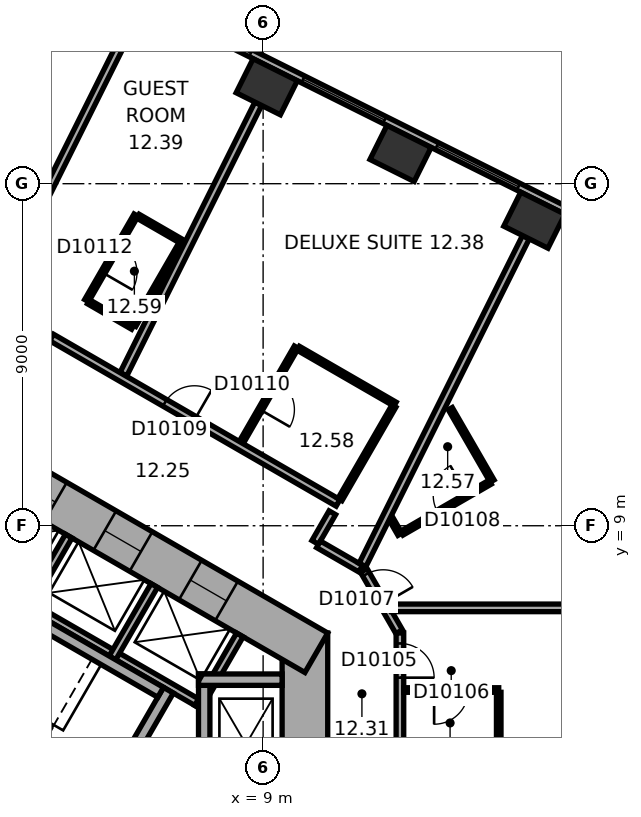
"""IFC4 building model, lengths in metres.
Left out: names, types, materials, properties, quantities, classifications, styles, units other than length and angle.
Written with IfcOpenShell. Run it as: python <this file> out.ifc"""

import sys

from ifc_helpers import new_model, si_unit, direction, frame, frame_2d, origin, origin_2d, place, context, subcontext, project, spatial, rectangle, extrude, element, fill, save


model = new_model("IFC4")
c1 = context("Model", 3, precision=1e-05, world=origin(), true_north=direction((0.0, 1.0)))
c2 = subcontext(c1, "Body", "Model", "MODEL_VIEW")
j1 = project(units=[si_unit("LENGTHUNIT", "METRE"), si_unit("PLANEANGLEUNIT", "RADIAN")], contexts=[c1])
p1 = place(None, origin())
s1 = spatial("IfcSite", under=j1, at=p1, CompositionType="ELEMENT")
p2 = place(p1, origin())
s2 = spatial("IfcBuilding", under=s1, at=p2, CompositionType="ELEMENT")
p3 = place(p2, frame((0.0, 0.0, 60.5)))
s3 = spatial("IfcBuildingStorey", under=s2, at=p3, CompositionType="ELEMENT", Elevation=60.5)
for number, where, z_axis, x_axis in (
    (1, (16.138, 17.04, 0.0), (0.0, 0.0, 1.0), (-0.895, 0.446, 0.0)),
    (2, (12.616, 18.795, 0.0), (0.0, 0.0, 1.0), (-0.895, 0.446, 0.0)),
    (3, (9.095, 20.551, 0.0), (0.0, 0.0, 1.0), (-0.895, 0.446, 0.0)),
):
    element("IfcColumn", number, at=place(p3, frame(where, z_axis=z_axis, x_axis=x_axis)), inside=s3, PredefinedType="COLUMN", context=c2, shape_type="SweptSolid", body=[
        extrude(rectangle(XDim=1.3, YDim=1.0, at=origin_2d()), origin(), (0.0, 0.0, 1.0), 3.3),
    ])
p4 = place(p3, frame((10.1, -6.177, 0.0), z_axis=(0.0, 0.0, 1.0), x_axis=(0.0, 1.0, 0.0)))
e4 = element("IfcWall", 4, at=p4, inside=s3, PredefinedType="SHEAR", context=c2, shape_type="SweptSolid", body=[
    extrude(rectangle(XDim=12.355, YDim=1.2, at=frame_2d((6.177, 0.0))), origin(), (0.0, 0.0, 1.0), 3.3),
])
p5 = place(p4, frame((6.378, 0.0, 0.0)))
e5 = element("IfcOpeningElement", 5, at=p5, cuts=e4, PredefinedType="OPENING", context=c2, shape_type="SweptSolid", body=[
    extrude(rectangle(XDim=1.5, YDim=2.1, at=frame_2d((0.75, 1.05))), frame((0.0, 0.61, 0.0), z_axis=(0.0, -1.0, 0.0), x_axis=(1.0, 0.0, 0.0)), (0.0, 0.0, 1.0), 1.22),
])
p6 = place(p4, frame((1.828, 0.0, 0.0)))
e6 = element("IfcOpeningElement", 6, at=p6, cuts=e4, PredefinedType="OPENING", context=c2, shape_type="SweptSolid", body=[
    extrude(rectangle(XDim=1.1, YDim=2.1, at=frame_2d((0.55, 1.05))), frame((0.0, 0.61, 0.0), z_axis=(0.0, -1.0, 0.0), x_axis=(1.0, 0.0, 0.0)), (0.0, 0.0, 1.0), 1.22),
])
p7 = place(p4, frame((4.427, 0.0, 0.0)))
e7 = element("IfcOpeningElement", 7, at=p7, cuts=e4, PredefinedType="OPENING", context=c2, shape_type="SweptSolid", body=[
    extrude(rectangle(XDim=1.1, YDim=2.1, at=frame_2d((0.55, 1.05))), frame((0.0, 0.61, 0.0), z_axis=(0.0, -1.0, 0.0), x_axis=(1.0, 0.0, 0.0)), (0.0, 0.0, 1.0), 1.22),
])
p8 = place(p3, frame((10.4, 5.658, 0.0), z_axis=(0.0, 0.0, 1.0), x_axis=(-0.866021384402, 0.500006961711, 0.0)))
e8 = element("IfcWall", 8, at=p8, inside=s3, PredefinedType="SHEAR", context=c2, shape_type="SweptSolid", body=[
    extrude(rectangle(XDim=12.355, YDim=1.2, at=frame_2d((6.178, 0.0))), origin(), (0.0, 0.0, 1.0), 3.3),
])
p9 = place(p8, frame((2.728, 0.0, 0.0)))
e9 = element("IfcOpeningElement", 9, at=p9, cuts=e8, PredefinedType="OPENING", context=c2, shape_type="SweptSolid", body=[
    extrude(rectangle(XDim=1.1, YDim=2.1, at=frame_2d((0.55, 1.05))), frame((0.0, 0.61, 0.0), z_axis=(0.0, -1.0, 0.0), x_axis=(1.0, 0.0, 0.0)), (0.0, 0.0, 1.0), 1.22),
])
p10 = place(p8, frame((5.328, 0.0, 0.0)))
e10 = element("IfcOpeningElement", 10, at=p10, cuts=e8, PredefinedType="OPENING", context=c2, shape_type="SweptSolid", body=[
    extrude(rectangle(XDim=1.1, YDim=2.1, at=frame_2d((0.55, 1.05))), frame((0.0, 0.61, 0.0), z_axis=(0.0, -1.0, 0.0), x_axis=(1.0, 0.0, 0.0)), (0.0, 0.0, 1.0), 1.22),
])
p11 = place(p8, frame((7.928, 0.0, 0.0)))
e11 = element("IfcOpeningElement", 11, at=p11, cuts=e8, PredefinedType="OPENING", context=c2, shape_type="SweptSolid", body=[
    extrude(rectangle(XDim=1.1, YDim=2.1, at=frame_2d((0.55, 1.05))), frame((0.0, 0.61, 0.0), z_axis=(0.0, -1.0, 0.0), x_axis=(1.0, 0.0, 0.0)), (0.0, 0.0, 1.0), 1.22),
])
p12 = place(p3, frame((20.63, 15.47, 0.0), z_axis=(0.0, 0.0, 1.0), x_axis=(-0.894934518609, 0.446197498203, 0.0)))
e12 = element("IfcWall", 12, at=p12, inside=s3, PredefinedType="STANDARD", context=c2, shape_type="SweptSolid", body=[
    extrude(rectangle(XDim=21.246, YDim=0.2, at=frame_2d((10.623, 0.0))), origin(), (0.0, 0.0, 1.0), 3.3),
])
p13 = place(p12, frame((1.553, 0.0, 0.8)))
e13 = element("IfcOpeningElement", 13, at=p13, cuts=e12, PredefinedType="OPENING", context=c2, shape_type="SweptSolid", body=[
    extrude(rectangle(XDim=2.4, YDim=1.7, at=frame_2d((1.2, 0.85))), frame((0.0, 0.11, 0.0), z_axis=(0.0, -1.0, 0.0), x_axis=(1.0, 0.0, 0.0)), (0.0, 0.0, 1.0), 0.22),
])
p14 = place(p12, frame((5.488, 0.0, 0.8)))
e14 = element("IfcOpeningElement", 14, at=p14, cuts=e12, PredefinedType="OPENING", context=c2, shape_type="SweptSolid", body=[
    extrude(rectangle(XDim=2.4, YDim=1.7, at=frame_2d((1.2, 0.85))), frame((0.0, 0.11, 0.0), z_axis=(0.0, -1.0, 0.0), x_axis=(1.0, 0.0, 0.0)), (0.0, 0.0, 1.0), 0.22),
])
p15 = place(p12, frame((9.422, 0.0, 0.8)))
e15 = element("IfcOpeningElement", 15, at=p15, cuts=e12, PredefinedType="OPENING", context=c2, shape_type="SweptSolid", body=[
    extrude(rectangle(XDim=2.4, YDim=1.7, at=frame_2d((1.2, 0.85))), frame((0.0, 0.11, 0.0), z_axis=(0.0, -1.0, 0.0), x_axis=(1.0, 0.0, 0.0)), (0.0, 0.0, 1.0), 0.22),
])
p16 = place(p12, frame((13.357, 0.0, 0.8)))
e16 = element("IfcOpeningElement", 16, at=p16, cuts=e12, PredefinedType="OPENING", context=c2, shape_type="SweptSolid", body=[
    extrude(rectangle(XDim=2.4, YDim=1.7, at=frame_2d((1.2, 0.85))), frame((0.0, 0.11, 0.0), z_axis=(0.0, -1.0, 0.0), x_axis=(1.0, 0.0, 0.0)), (0.0, 0.0, 1.0), 0.22),
])
p17 = place(p12, frame((17.292, 0.0, 0.8)))
e17 = element("IfcOpeningElement", 17, at=p17, cuts=e12, PredefinedType="OPENING", context=c2, shape_type="SweptSolid", body=[
    extrude(rectangle(XDim=2.4, YDim=1.7, at=frame_2d((1.2, 0.85))), frame((0.0, 0.11, 0.0), z_axis=(0.0, -1.0, 0.0), x_axis=(1.0, 0.0, 0.0)), (0.0, 0.0, 1.0), 0.22),
])
p18 = place(p3, frame((7.424, 4.259, 0.0), z_axis=(0.0, 0.0, 1.0), x_axis=(-0.866026010844, 0.49999894854, 0.0)))
e18 = element("IfcWall", 18, at=p18, inside=s3, PredefinedType="PARTITIONING", context=c2, shape_type="SweptSolid", body=[
    extrude(rectangle(XDim=8.0, YDim=0.2, at=frame_2d((4.0, 0.0))), origin(), (0.0, 0.0, 1.0), 3.05),
])
for number, where, z_axis, x_axis in (
    (19, (7.287, 4.222, 0.0), (0.0, 0.0, 1.0), (0.5, 0.866, 0.0)),
    (20, (5.036, 5.522, 0.0), (0.0, 0.0, 1.0), (0.5, 0.866, 0.0)),
    (21, (2.784, 6.822, 0.0), (0.0, 0.0, 1.0), (0.5, 0.866, 0.0)),
):
    element("IfcWall", number, at=place(p3, frame(where, z_axis=z_axis, x_axis=x_axis)), inside=s3, PredefinedType="PARTITIONING", context=c2, shape_type="SweptSolid", body=[
        extrude(rectangle(XDim=2.2, YDim=0.2, at=frame_2d((1.1, 0.0))), origin(), (0.0, 0.0, 1.0), 3.05),
    ])
p19 = place(p3, frame((4.158, 0.602, 0.0), z_axis=(0.0, 0.0, 1.0), x_axis=(0.499977259774, 0.866038532462, 0.0)))
e22 = element("IfcWall", 22, at=p19, inside=s3, PredefinedType="SHEAR", context=c2, shape_type="SweptSolid", body=[
    extrude(rectangle(XDim=4.7, YDim=0.3, at=frame_2d((2.35, 0.0))), origin(), (0.0, 0.0, 1.0), 3.05),
])
p20 = place(p19, frame((0.8, 0.0, 0.0)))
e23 = element("IfcOpeningElement", 23, at=p20, cuts=e22, PredefinedType="OPENING", context=c2, shape_type="SweptSolid", body=[
    extrude(rectangle(XDim=1.2, YDim=2.1, at=frame_2d((0.6, 1.05))), frame((0.0, 0.16, 0.0), z_axis=(0.0, -1.0, 0.0), x_axis=(1.0, 0.0, 0.0)), (0.0, 0.0, 1.0), 0.32),
])
for number, where, z_axis, x_axis in (
    (24, (4.103, 0.807, 0.0), (0.0, 0.0, 1.0), (-0.866, 0.5, 0.0)),
    (25, (6.303, 4.617, 0.0), (0.0, 0.0, 1.0), (-0.866, 0.5, 0.0)),
):
    element("IfcWall", number, at=place(p3, frame(where, z_axis=z_axis, x_axis=x_axis)), inside=s3, PredefinedType="SHEAR", context=c2, shape_type="SweptSolid", body=[
        extrude(rectangle(XDim=7.06, YDim=0.3, at=frame_2d((3.53, 0.0))), origin(), (0.0, 0.0, 1.0), 3.05),
    ])
p21 = place(p3, frame((7.45, 1.75, 0.0), z_axis=(0.0, 0.0, 1.0), x_axis=(0.0, 1.0, 0.0)))
e26 = element("IfcWall", 26, at=p21, inside=s3, PredefinedType="SHEAR", context=c2, shape_type="SweptSolid", body=[
    extrude(rectangle(XDim=3.35, YDim=0.3, at=frame_2d((1.675, 0.0))), origin(), (0.0, 0.0, 1.0), 3.05),
])
p22 = place(p3, frame((7.3, 4.95, 0.0), z_axis=(0.0, 0.0, 1.0), x_axis=(1.0, 0.0, 0.0)))
e27 = element("IfcWall", 27, at=p22, inside=s3, PredefinedType="SHEAR", context=c2, shape_type="SweptSolid", body=[
    extrude(rectangle(XDim=2.2, YDim=0.3, at=frame_2d((1.1, 0.0))), origin(), (0.0, 0.0, 1.0), 3.05),
])
p23 = place(p3, frame((4.356, 14.922, 0.0), z_axis=(0.0, 0.0, 1.0), x_axis=(0.499936506574, 0.866062058628, 0.0)))
e28 = element("IfcWall", 28, at=p23, inside=s3, PredefinedType="PARTITIONING", context=c2, shape_type="SweptSolid", body=[
    extrude(rectangle(XDim=2.6, YDim=0.12, at=frame_2d((1.3, 0.0))), origin(), (0.0, 0.0, 1.0), 3.05),
])
p24 = place(p23, frame((0.85, 0.0, 0.0)))
e29 = element("IfcOpeningElement", 29, at=p24, cuts=e28, PredefinedType="OPENING", context=c2, shape_type="SweptSolid", body=[
    extrude(rectangle(XDim=0.9, YDim=2.1, at=frame_2d((0.45, 1.05))), frame((0.0, 0.07, 0.0), z_axis=(0.0, -1.0, 0.0), x_axis=(1.0, 0.0, 0.0)), (0.0, 0.0, 1.0), 0.14),
])
p25 = place(p3, frame((5.351, 21.859, 0.0), z_axis=(0.0, 0.0, 1.0), x_axis=(-0.446205309328, -0.894930624086, 0.0)))
e30 = element("IfcWall", 30, at=p25, inside=s3, PredefinedType="PARTITIONING", context=c2, shape_type="SweptSolid", body=[
    extrude(rectangle(XDim=8.913, YDim=0.2, at=frame_2d((4.457, 0.0))), origin(), (0.0, 0.0, 1.0), 2.6),
])
p26 = place(p3, frame((5.569, 14.222, 0.0), z_axis=(0.0, 0.0, 1.0), x_axis=(-0.866036909293, 0.499980071345, 0.0)))
e31 = element("IfcWall", 31, at=p26, inside=s3, PredefinedType="PARTITIONING", context=c2, shape_type="SweptSolid", body=[
    extrude(rectangle(XDim=1.34, YDim=0.12, at=frame_2d((0.67, 0.0))), origin(), (0.0, 0.0, 1.0), 3.05),
])
p27 = place(p3, frame((5.708, 17.144, 0.0), z_axis=(0.0, 0.0, 1.0), x_axis=(0.866082447003, -0.499901185229, 0.0)))
e32 = element("IfcWall", 32, at=p27, inside=s3, PredefinedType="PARTITIONING", context=c2, shape_type="SweptSolid", body=[
    extrude(rectangle(XDim=1.34, YDim=0.12, at=frame_2d((0.67, 0.0))), origin(), (0.0, 0.0, 1.0), 3.05),
])
p28 = place(p3, frame((6.839, 16.422, 0.0), z_axis=(0.0, 0.0, 1.0), x_axis=(-0.50000366821, -0.866023285932, 0.0)))
e33 = element("IfcWall", 33, at=p28, inside=s3, PredefinedType="PARTITIONING", context=c2, shape_type="SweptSolid", body=[
    extrude(rectangle(XDim=2.48, YDim=0.12, at=frame_2d((1.24, 0.0))), origin(), (0.0, 0.0, 1.0), 3.05),
])
p29 = place(p3, frame((8.424, 11.188, 0.0), z_axis=(0.0, 0.0, 1.0), x_axis=(0.49995078051, 0.866053818805, 0.0)))
e34 = element("IfcWall", 34, at=p29, inside=s3, PredefinedType="PARTITIONING", context=c2, shape_type="SweptSolid", body=[
    extrude(rectangle(XDim=2.9, YDim=0.12, at=frame_2d((1.45, 0.0))), origin(), (0.0, 0.0, 1.0), 3.05),
])
p30 = place(p29, frame((1.0, 0.0, 0.0)))
e35 = element("IfcOpeningElement", 35, at=p30, cuts=e34, PredefinedType="OPENING", context=c2, shape_type="SweptSolid", body=[
    extrude(rectangle(XDim=0.9, YDim=2.1, at=frame_2d((0.45, 1.05))), frame((0.0, 0.07, 0.0), z_axis=(0.0, -1.0, 0.0), x_axis=(1.0, 0.0, 0.0)), (0.0, 0.0, 1.0), 0.14),
])
p31 = place(p3, frame((8.872, 20.104, 0.0), z_axis=(0.0, 0.0, 1.0), x_axis=(-0.446218378653, -0.894924107706, 0.0)))
e36 = element("IfcWall", 36, at=p31, inside=s3, PredefinedType="PARTITIONING", context=c2, shape_type="SweptSolid", body=[
    extrude(rectangle(XDim=7.95, YDim=0.2, at=frame_2d((3.975, 0.0))), origin(), (0.0, 0.0, 1.0), 3.05),
])
p32 = place(p3, frame((9.926, 13.67, 0.0), z_axis=(0.0, 0.0, 1.0), x_axis=(0.866032090307, -0.499988418424, 0.0)))
e37 = element("IfcWall", 37, at=p32, inside=s3, PredefinedType="PARTITIONING", context=c2, shape_type="SweptSolid", body=[
    extrude(rectangle(XDim=2.94, YDim=0.12, at=frame_2d((1.47, 0.0))), origin(), (0.0, 0.0, 1.0), 3.05),
])
p33 = place(p3, frame((10.371, 8.561, 0.0), z_axis=(0.0, 0.0, 1.0), x_axis=(0.50004290449, 0.866000631449, 0.0)))
e38 = element("IfcWall", 38, at=p33, inside=s3, PredefinedType="PARTITIONING", context=c2, shape_type="SweptSolid", body=[
    extrude(rectangle(XDim=0.901, YDim=0.2, at=frame_2d((0.451, 0.0))), origin(), (0.0, 0.0, 1.0), 3.05),
])
p34 = place(p3, frame((10.972, 9.602, 0.0), z_axis=(0.0, 0.0, 1.0), x_axis=(-0.866033277307, 0.499986362411, 0.0)))
e39 = element("IfcWall", 39, at=p34, inside=s3, PredefinedType="PARTITIONING", context=c2, shape_type="SweptSolid", body=[
    extrude(rectangle(XDim=8.702, YDim=0.2, at=frame_2d((4.351, 0.0))), origin(), (0.0, 0.0, 1.0), 3.05),
])
p35 = place(p34, frame((4.364, 0.0, 0.0)))
e40 = element("IfcOpeningElement", 40, at=p35, cuts=e39, PredefinedType="OPENING", context=c2, shape_type="SweptSolid", body=[
    extrude(rectangle(XDim=0.9, YDim=2.1, at=frame_2d((0.45, 1.05))), frame((0.0, 0.11, 0.0), z_axis=(0.0, -1.0, 0.0), x_axis=(1.0, 0.0, 0.0)), (0.0, 0.0, 1.0), 0.22),
])
p36 = place(p3, frame((11.566, 7.871, 0.0), z_axis=(0.0, 0.0, 1.0), x_axis=(-0.866004557827, 0.500036104519, 0.0)))
e41 = element("IfcWall", 41, at=p36, inside=s3, PredefinedType="PARTITIONING", context=c2, shape_type="SweptSolid", body=[
    extrude(rectangle(XDim=1.28, YDim=0.2, at=frame_2d((0.64, 0.0))), origin(), (0.0, 0.0, 1.0), 3.05),
])
p37 = place(p3, frame((12.442, 12.148, 0.0), z_axis=(0.0, 0.0, 1.0), x_axis=(-0.49994816717, -0.866055327414, 0.0)))
e42 = element("IfcWall", 42, at=p37, inside=s3, PredefinedType="PARTITIONING", context=c2, shape_type="SweptSolid", body=[
    extrude(rectangle(XDim=2.84, YDim=0.12, at=frame_2d((1.42, 0.0))), origin(), (0.0, 0.0, 1.0), 3.05),
])
p38 = place(p3, frame((12.58, 6.212, 0.0), z_axis=(0.0, 0.0, 1.0), x_axis=(-0.500063286585, 0.865988862174, 0.0)))
e43 = element("IfcWall", 43, at=p38, inside=s3, PredefinedType="PARTITIONING", context=c2, shape_type="SweptSolid", body=[
    extrude(rectangle(XDim=1.86, YDim=0.2, at=frame_2d((0.93, 0.0))), origin(), (0.0, 0.0, 1.0), 3.05),
])
p39 = place(p38, frame((0.842, 0.0, 0.0)))
e44 = element("IfcOpeningElement", 44, at=p39, cuts=e43, PredefinedType="OPENING", context=c2, shape_type="SweptSolid", body=[
    extrude(rectangle(XDim=0.9, YDim=2.1, at=frame_2d((0.45, 1.05))), frame((0.0, 0.11, 0.0), z_axis=(0.0, -1.0, 0.0), x_axis=(1.0, 0.0, 0.0)), (0.0, 0.0, 1.0), 0.22),
])
p40 = place(p3, frame((12.6, 3.004, 0.0), z_axis=(0.0, 0.0, 1.0), x_axis=(0.0, 1.0, 0.0)))
e45 = element("IfcWall", 45, at=p40, inside=s3, PredefinedType="PARTITIONING", context=c2, shape_type="SweptSolid", body=[
    extrude(rectangle(XDim=3.173, YDim=0.2, at=frame_2d((1.586, 0.0))), origin(), (0.0, 0.0, 1.0), 3.05),
])
p41 = place(p40, frame((1.998, 0.0, 0.0)))
e46 = element("IfcOpeningElement", 46, at=p41, cuts=e45, PredefinedType="OPENING", context=c2, shape_type="SweptSolid", body=[
    extrude(rectangle(XDim=0.9, YDim=2.1, at=frame_2d((0.45, 1.05))), frame((0.0, 0.11, 0.0), z_axis=(0.0, -1.0, 0.0), x_axis=(1.0, 0.0, 0.0)), (0.0, 0.0, 1.0), 0.22),
])
p42 = place(p3, frame((12.601, 8.776, 0.0), z_axis=(0.0, 0.0, 1.0), x_axis=(-0.500166486798, 0.865929261247, 0.0)))
e47 = element("IfcWall", 47, at=p42, inside=s3, PredefinedType="PARTITIONING", context=c2, shape_type="SweptSolid", body=[
    extrude(rectangle(XDim=0.476, YDim=0.12, at=frame_2d((0.238, 0.0))), origin(), (0.0, 0.0, 1.0), 3.05),
])
p43 = place(p3, frame((12.7, 4.677, 0.0), z_axis=(0.0, 0.0, 1.0), x_axis=(1.0, 0.0, 0.0)))
e48 = element("IfcWall", 48, at=p43, inside=s3, PredefinedType="PARTITIONING", context=c2, shape_type="SweptSolid", body=[
    extrude(rectangle(XDim=2.5, YDim=0.12, at=frame_2d((1.25, 0.0))), origin(), (0.0, 0.0, 1.0), 3.05),
])
p44 = place(p43, frame((0.8, 0.0, 0.0)))
e49 = element("IfcOpeningElement", 49, at=p44, cuts=e48, PredefinedType="OPENING", context=c2, shape_type="SweptSolid", body=[
    extrude(rectangle(XDim=0.9, YDim=2.1, at=frame_2d((0.45, 1.05))), frame((0.0, 0.07, 0.0), z_axis=(0.0, -1.0, 0.0), x_axis=(1.0, 0.0, 0.0)), (0.0, 0.0, 1.0), 0.14),
])
p45 = place(p3, frame((13.926, 12.081, 0.0), z_axis=(0.0, 0.0, 1.0), x_axis=(0.499994660107, -0.866028486751, 0.0)))
e50 = element("IfcWall", 50, at=p45, inside=s3, PredefinedType="PARTITIONING", context=c2, shape_type="SweptSolid", body=[
    extrude(rectangle(XDim=2.2, YDim=0.12, at=frame_2d((1.1, 0.0))), origin(), (0.0, 0.0, 1.0), 3.05),
])
p46 = place(p3, frame((14.974, 10.146, 0.0), z_axis=(0.0, 0.0, 1.0), x_axis=(-0.86599746015, -0.500048396672, 0.0)))
e51 = element("IfcWall", 51, at=p46, inside=s3, PredefinedType="PARTITIONING", context=c2, shape_type="SweptSolid", body=[
    extrude(rectangle(XDim=2.68, YDim=0.12, at=frame_2d((1.34, 0.0))), origin(), (0.0, 0.0, 1.0), 3.05),
])
p47 = place(p46, frame((0.69, 0.0, 0.0)))
e52 = element("IfcOpeningElement", 52, at=p47, cuts=e51, PredefinedType="OPENING", context=c2, shape_type="SweptSolid", body=[
    extrude(rectangle(XDim=0.9, YDim=2.1, at=frame_2d((0.45, 1.05))), frame((0.0, 0.07, 0.0), z_axis=(0.0, -1.0, 0.0), x_axis=(1.0, 0.0, 0.0)), (0.0, 0.0, 1.0), 0.14),
])
p48 = place(p3, frame((15.2, 4.618, 0.0), z_axis=(0.0, 0.0, 1.0), x_axis=(0.0, -1.0, 0.0)))
e53 = element("IfcWall", 53, at=p48, inside=s3, PredefinedType="PARTITIONING", context=c2, shape_type="SweptSolid", body=[
    extrude(rectangle(XDim=1.613, YDim=0.12, at=frame_2d((0.807, 0.0))), origin(), (0.0, 0.0, 1.0), 3.05),
])
p49 = place(p3, frame((15.915, 16.592, 0.0), z_axis=(0.0, 0.0, 1.0), x_axis=(-0.446199736347, -0.894933402709, 0.0)))
e54 = element("IfcWall", 54, at=p49, inside=s3, PredefinedType="PARTITIONING", context=c2, shape_type="SweptSolid", body=[
    extrude(rectangle(XDim=9.635, YDim=0.2, at=frame_2d((4.817, 0.0))), origin(), (0.0, 0.0, 1.0), 3.05),
])
p50 = place(p3, frame((21.95, 6.839, 0.0), z_axis=(0.0, 0.0, 1.0), x_axis=(-1.0, 0.0, 0.0)))
e55 = element("IfcWall", 55, at=p50, inside=s3, PredefinedType="PARTITIONING", context=c2, shape_type="SweptSolid", body=[
    extrude(rectangle(XDim=9.572, YDim=0.2, at=frame_2d((4.786, 0.0))), origin(), (0.0, 0.0, 1.0), 3.05),
])
p51 = place(p14, origin())
e56 = element("IfcWindow", 56, at=p51, inside=s3, PartitioningType="SINGLE_PANEL", PredefinedType="WINDOW", context=c2, shape_type="SweptSolid", body=[
    extrude(rectangle(XDim=2.4, YDim=1.7, at=frame_2d((1.2, 0.85))), frame((0.0, 0.03, 0.0), z_axis=(0.0, -1.0, 0.0), x_axis=(1.0, 0.0, 0.0)), (0.0, 0.0, 1.0), 0.06),
])
fill(e14, e56)
p52 = place(p15, origin())
e57 = element("IfcWindow", 57, at=p52, inside=s3, PartitioningType="SINGLE_PANEL", PredefinedType="WINDOW", context=c2, shape_type="SweptSolid", body=[
    extrude(rectangle(XDim=2.4, YDim=1.7, at=frame_2d((1.2, 0.85))), frame((0.0, 0.03, 0.0), z_axis=(0.0, -1.0, 0.0), x_axis=(1.0, 0.0, 0.0)), (0.0, 0.0, 1.0), 0.06),
])
fill(e15, e57)
p53 = place(p16, origin())
e58 = element("IfcWindow", 58, at=p53, inside=s3, PartitioningType="SINGLE_PANEL", PredefinedType="WINDOW", context=c2, shape_type="SweptSolid", body=[
    extrude(rectangle(XDim=2.4, YDim=1.7, at=frame_2d((1.2, 0.85))), frame((0.0, 0.03, 0.0), z_axis=(0.0, -1.0, 0.0), x_axis=(1.0, 0.0, 0.0)), (0.0, 0.0, 1.0), 0.06),
])
fill(e16, e58)
p54 = place(p9, origin())
e59 = element("IfcDoor", 59, at=p54, inside=s3, OperationType="DOUBLE_DOOR_SLIDING", PredefinedType="DOOR", context=c2, shape_type="SweptSolid", body=[
    extrude(rectangle(XDim=1.1, YDim=2.1, at=frame_2d((0.55, 1.05))), frame((0.0, 0.025, 0.0), z_axis=(0.0, -1.0, 0.0), x_axis=(1.0, 0.0, 0.0)), (0.0, 0.0, 1.0), 0.05),
])
fill(e9, e59)
p55 = place(p10, origin())
e60 = element("IfcDoor", 60, at=p55, inside=s3, OperationType="DOUBLE_DOOR_SLIDING", PredefinedType="DOOR", context=c2, shape_type="SweptSolid", body=[
    extrude(rectangle(XDim=1.1, YDim=2.1, at=frame_2d((0.55, 1.05))), frame((0.0, 0.025, 0.0), z_axis=(0.0, -1.0, 0.0), x_axis=(1.0, 0.0, 0.0)), (0.0, 0.0, 1.0), 0.05),
])
fill(e10, e60)
p56 = place(p11, origin())
e61 = element("IfcDoor", 61, at=p56, inside=s3, OperationType="DOUBLE_DOOR_SLIDING", PredefinedType="DOOR", context=c2, shape_type="SweptSolid", body=[
    extrude(rectangle(XDim=1.1, YDim=2.1, at=frame_2d((0.55, 1.05))), frame((0.0, 0.025, 0.0), z_axis=(0.0, -1.0, 0.0), x_axis=(1.0, 0.0, 0.0)), (0.0, 0.0, 1.0), 0.05),
])
fill(e11, e61)
p57 = place(p41, origin())
e62 = element("IfcDoor", 62, at=p57, inside=s3, OperationType="SINGLE_SWING_LEFT", PredefinedType="DOOR", context=c2, shape_type="SweptSolid", body=[
    extrude(rectangle(XDim=0.9, YDim=2.1, at=frame_2d((0.45, 1.05))), frame((0.0, 0.025, 0.0), z_axis=(0.0, -1.0, 0.0), x_axis=(1.0, 0.0, 0.0)), (0.0, 0.0, 1.0), 0.05),
])
fill(e46, e62)
p58 = place(p44, origin())
e63 = element("IfcDoor", 63, at=p58, inside=s3, OperationType="SINGLE_SWING_LEFT", PredefinedType="DOOR", context=c2, shape_type="SweptSolid", body=[
    extrude(rectangle(XDim=0.9, YDim=2.1, at=frame_2d((0.45, 1.05))), frame((0.0, 0.025, 0.0), z_axis=(0.0, -1.0, 0.0), x_axis=(1.0, 0.0, 0.0)), (0.0, 0.0, 1.0), 0.05),
])
fill(e49, e63)
p59 = place(p39, origin())
e64 = element("IfcDoor", 64, at=p59, inside=s3, OperationType="SINGLE_SWING_LEFT", PredefinedType="DOOR", context=c2, shape_type="SweptSolid", body=[
    extrude(rectangle(XDim=0.9, YDim=2.1, at=frame_2d((0.45, 1.05))), frame((0.0, 0.025, 0.0), z_axis=(0.0, -1.0, 0.0), x_axis=(1.0, 0.0, 0.0)), (0.0, 0.0, 1.0), 0.05),
])
fill(e44, e64)
p60 = place(p47, origin())
e65 = element("IfcDoor", 65, at=p60, inside=s3, OperationType="SINGLE_SWING_LEFT", PredefinedType="DOOR", context=c2, shape_type="SweptSolid", body=[
    extrude(rectangle(XDim=0.9, YDim=2.1, at=frame_2d((0.45, 1.05))), frame((0.0, 0.025, 0.0), z_axis=(0.0, -1.0, 0.0), x_axis=(1.0, 0.0, 0.0)), (0.0, 0.0, 1.0), 0.05),
])
fill(e52, e65)
p61 = place(p35, origin())
e66 = element("IfcDoor", 66, at=p61, inside=s3, OperationType="SINGLE_SWING_LEFT", PredefinedType="DOOR", context=c2, shape_type="SweptSolid", body=[
    extrude(rectangle(XDim=0.9, YDim=2.1, at=frame_2d((0.45, 1.05))), frame((0.0, 0.025, 0.0), z_axis=(0.0, -1.0, 0.0), x_axis=(1.0, 0.0, 0.0)), (0.0, 0.0, 1.0), 0.05),
])
fill(e40, e66)
p62 = place(p30, origin())
e67 = element("IfcDoor", 67, at=p62, inside=s3, OperationType="SINGLE_SWING_LEFT", PredefinedType="DOOR", context=c2, shape_type="SweptSolid", body=[
    extrude(rectangle(XDim=0.9, YDim=2.1, at=frame_2d((0.45, 1.05))), frame((0.0, 0.025, 0.0), z_axis=(0.0, -1.0, 0.0), x_axis=(1.0, 0.0, 0.0)), (0.0, 0.0, 1.0), 0.05),
])
fill(e35, e67)
p63 = place(p24, origin())
e68 = element("IfcDoor", 68, at=p63, inside=s3, OperationType="SINGLE_SWING_LEFT", PredefinedType="DOOR", context=c2, shape_type="SweptSolid", body=[
    extrude(rectangle(XDim=0.9, YDim=2.1, at=frame_2d((0.45, 1.05))), frame((0.0, 0.025, 0.0), z_axis=(0.0, -1.0, 0.0), x_axis=(1.0, 0.0, 0.0)), (0.0, 0.0, 1.0), 0.05),
])
fill(e29, e68)
save(model, sys.argv[1])
